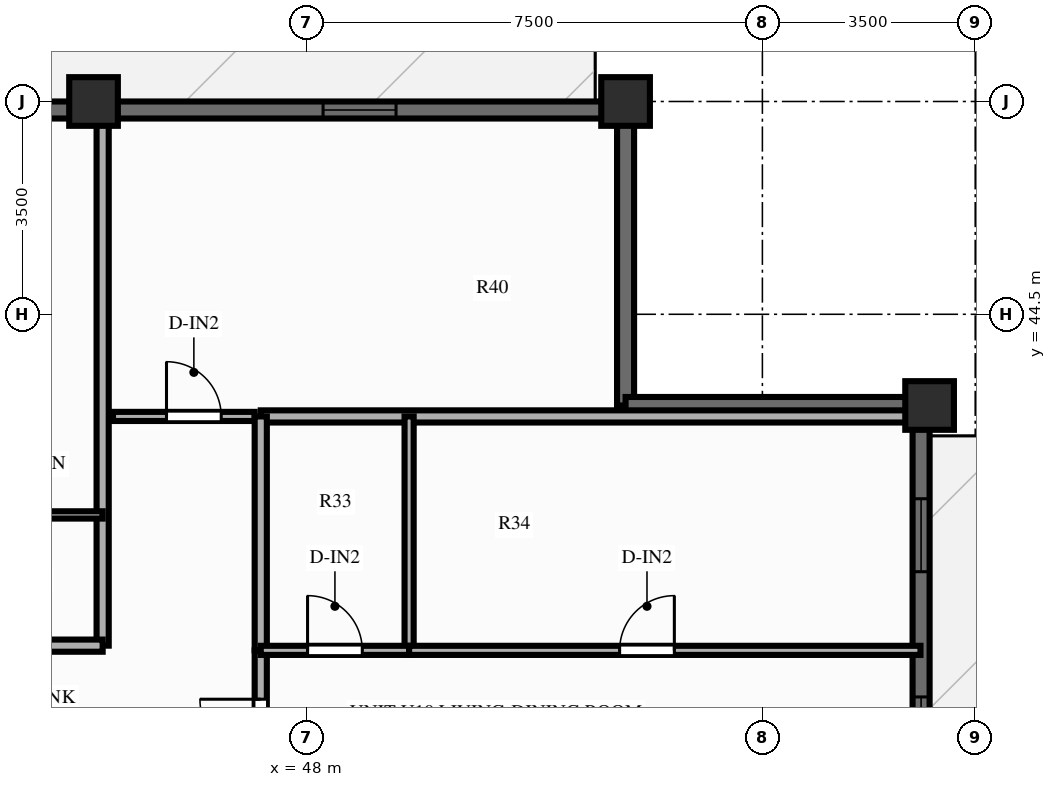
"""IFC4 building model, lengths in metres.
Left out: names, types, materials, properties, quantities, classifications, styles, units other than length and angle.
Written with IfcOpenShell. Run it as: python <this file> out.ifc"""

import sys

from ifc_helpers import new_model, si_unit, direction, frame, frame_2d, origin, origin_2d, place, context, subcontext, project, spatial, rectangle, extrude, source, transform, mapped, element, fill, save


model = new_model("IFC4")
c1 = context("Model", 3, precision=1e-05, world=origin(), true_north=direction((0.0, 1.0)))
c2 = subcontext(c1, "Body", "Model", "MODEL_VIEW")
j1 = project(units=[si_unit("LENGTHUNIT", "METRE"), si_unit("PLANEANGLEUNIT", "RADIAN")], contexts=[c1])
p1 = place(None, origin())
s1 = spatial("IfcSite", under=j1, at=p1, CompositionType="ELEMENT")
p2 = place(p1, origin())
s2 = spatial("IfcBuilding", under=s1, at=p2, CompositionType="ELEMENT")
p3 = place(p2, frame((0.0, 0.0, 179.8)))
s3 = spatial("IfcBuildingStorey", under=s2, at=p3, CompositionType="ELEMENT", Elevation=179.8)
m1 = source(origin(), c2, "Body", "SweptSolid", [
    extrude(rectangle(XDim=0.8, YDim=0.8, at=origin_2d()), origin(), (0.0, 0.0, 1.0), 3.0),
])
for number, where, z_axis, x_axis in (
    (1, (58.25, 43.0, 0.0), (0.0, 0.0, 1.0), (1.0, 0.0, 0.0)),
    (2, (53.25, 48.0, 0.0), (0.0, 0.0, 1.0), (1.0, 0.0, 0.0)),
    (3, (44.5, 48.0, 0.0), (0.0, 0.0, 1.0), (1.0, 0.0, 0.0)),
):
    element("IfcColumn", number, at=place(p3, frame(where, z_axis=z_axis, x_axis=x_axis)), inside=s3, PredefinedType="COLUMN", context=c2, shape_type="MappedRepresentation", body=[
        mapped(m1, transform((0.0, 0.0, 0.0), scale=1.0)),
    ])
p4 = place(p3, frame((22.75, 47.86, 0.0), z_axis=(0.0, 0.0, 1.0), x_axis=(1.0, 0.0, 0.0)))
e4 = element("IfcWall", 4, at=p4, inside=s3, PredefinedType="SOLIDWALL", context=c2, shape_type="SweptSolid", body=[
    extrude(rectangle(XDim=30.5, YDim=0.28, at=frame_2d((15.25, 0.0))), origin(), (0.0, 0.0, 1.0), 2.28),
])
p5 = place(p4, frame((3.825, 0.0, 0.0)))
e5 = element("IfcOpeningElement", 5, at=p5, cuts=e4, PredefinedType="OPENING", context=c2, shape_type="SweptSolid", body=[
    extrude(rectangle(XDim=1.1, YDim=2.15, at=frame_2d((0.55, 1.075))), frame((0.0, 0.152, 0.0), z_axis=(0.0, -1.0, 0.0), x_axis=(1.0, 0.0, 0.0)), (0.0, 0.0, 1.0), 0.304),
])
p6 = place(p4, frame((9.395, 0.0, 0.25)))
e6 = element("IfcOpeningElement", 6, at=p6, cuts=e4, PredefinedType="OPENING", context=c2, shape_type="SweptSolid", body=[
    extrude(rectangle(XDim=0.95, YDim=1.5, at=frame_2d((0.475, 0.75))), frame((0.0, 0.152, 0.0), z_axis=(0.0, -1.0, 0.0), x_axis=(1.0, 0.0, 0.0)), (0.0, 0.0, 1.0), 0.304),
])
p7 = place(p4, frame((11.33, 0.0, 0.25)))
e7 = element("IfcOpeningElement", 7, at=p7, cuts=e4, PredefinedType="OPENING", context=c2, shape_type="SweptSolid", body=[
    extrude(rectangle(XDim=1.2, YDim=1.5, at=frame_2d((0.6, 0.75))), frame((0.0, 0.152, 0.0), z_axis=(0.0, -1.0, 0.0), x_axis=(1.0, 0.0, 0.0)), (0.0, 0.0, 1.0), 0.304),
])
p8 = place(p4, frame((13.894, 0.0, 0.25)))
e8 = element("IfcOpeningElement", 8, at=p8, cuts=e4, PredefinedType="OPENING", context=c2, shape_type="SweptSolid", body=[
    extrude(rectangle(XDim=1.2, YDim=1.5, at=frame_2d((0.6, 0.75))), frame((0.0, 0.152, 0.0), z_axis=(0.0, -1.0, 0.0), x_axis=(1.0, 0.0, 0.0)), (0.0, 0.0, 1.0), 0.304),
])
p9 = place(p4, frame((16.905, 0.0, 0.25)))
e9 = element("IfcOpeningElement", 9, at=p9, cuts=e4, PredefinedType="OPENING", context=c2, shape_type="SweptSolid", body=[
    extrude(rectangle(XDim=1.2, YDim=1.5, at=frame_2d((0.6, 0.75))), frame((0.0, 0.152, 0.0), z_axis=(0.0, -1.0, 0.0), x_axis=(1.0, 0.0, 0.0)), (0.0, 0.0, 1.0), 0.304),
])
p10 = place(p4, frame((19.72, 0.0, 0.25)))
e10 = element("IfcOpeningElement", 10, at=p10, cuts=e4, PredefinedType="OPENING", context=c2, shape_type="SweptSolid", body=[
    extrude(rectangle(XDim=1.2, YDim=1.5, at=frame_2d((0.6, 0.75))), frame((0.0, 0.152, 0.0), z_axis=(0.0, -1.0, 0.0), x_axis=(1.0, 0.0, 0.0)), (0.0, 0.0, 1.0), 0.304),
])
p11 = place(p4, frame((25.525, 0.0, 0.25)))
e11 = element("IfcOpeningElement", 11, at=p11, cuts=e4, PredefinedType="OPENING", context=c2, shape_type="SweptSolid", body=[
    extrude(rectangle(XDim=1.2, YDim=1.5, at=frame_2d((0.6, 0.75))), frame((0.0, 0.152, 0.0), z_axis=(0.0, -1.0, 0.0), x_axis=(1.0, 0.0, 0.0)), (0.0, 0.0, 1.0), 0.304),
])
p12 = place(p3, frame((58.11, 11.0, 0.0), z_axis=(0.0, 0.0, 1.0), x_axis=(0.0, 1.0, 0.0)))
e12 = element("IfcWall", 12, at=p12, inside=s3, PredefinedType="SOLIDWALL", context=c2, shape_type="SweptSolid", body=[
    extrude(rectangle(XDim=32.0, YDim=0.28, at=frame_2d((16.0, 0.0))), origin(), (0.0, 0.0, 1.0), 2.28),
])
p13 = place(p12, frame((1.05, 0.0, 0.25)))
e13 = element("IfcOpeningElement", 13, at=p13, cuts=e12, PredefinedType="OPENING", context=c2, shape_type="SweptSolid", body=[
    extrude(rectangle(XDim=1.2, YDim=1.5, at=frame_2d((0.6, 0.75))), frame((0.0, 0.152, 0.0), z_axis=(0.0, -1.0, 0.0), x_axis=(1.0, 0.0, 0.0)), (0.0, 0.0, 1.0), 0.304),
])
p14 = place(p12, frame((4.31, 0.0, 0.25)))
e14 = element("IfcOpeningElement", 14, at=p14, cuts=e12, PredefinedType="OPENING", context=c2, shape_type="SweptSolid", body=[
    extrude(rectangle(XDim=1.2, YDim=1.5, at=frame_2d((0.6, 0.75))), frame((0.0, 0.152, 0.0), z_axis=(0.0, -1.0, 0.0), x_axis=(1.0, 0.0, 0.0)), (0.0, 0.0, 1.0), 0.304),
])
p15 = place(p12, frame((8.882, 0.0, 0.25)))
e15 = element("IfcOpeningElement", 15, at=p15, cuts=e12, PredefinedType="OPENING", context=c2, shape_type="SweptSolid", body=[
    extrude(rectangle(XDim=1.2, YDim=1.5, at=frame_2d((0.6, 0.75))), frame((0.0, 0.152, 0.0), z_axis=(0.0, -1.0, 0.0), x_axis=(1.0, 0.0, 0.0)), (0.0, 0.0, 1.0), 0.304),
])
p16 = place(p12, frame((12.029, 0.0, 0.25)))
e16 = element("IfcOpeningElement", 16, at=p16, cuts=e12, PredefinedType="OPENING", context=c2, shape_type="SweptSolid", body=[
    extrude(rectangle(XDim=1.2, YDim=1.5, at=frame_2d((0.6, 0.75))), frame((0.0, 0.152, 0.0), z_axis=(0.0, -1.0, 0.0), x_axis=(1.0, 0.0, 0.0)), (0.0, 0.0, 1.0), 0.304),
])
p17 = place(p12, frame((16.718, 0.0, 0.0), z_axis=(0.0, 0.0, 1.0), x_axis=(-1.0, 0.0, 0.0)))
e17 = element("IfcOpeningElement", 17, at=p17, cuts=e12, PredefinedType="OPENING", context=c2, shape_type="SweptSolid", body=[
    extrude(rectangle(XDim=1.6, YDim=2.15, at=frame_2d((0.8, 1.075))), frame((0.0, 0.152, 0.0), z_axis=(0.0, -1.0, 0.0), x_axis=(1.0, 0.0, 0.0)), (0.0, 0.0, 1.0), 0.304),
])
p18 = place(p12, frame((19.163, 0.0, 0.25)))
e18 = element("IfcOpeningElement", 18, at=p18, cuts=e12, PredefinedType="OPENING", context=c2, shape_type="SweptSolid", body=[
    extrude(rectangle(XDim=1.2, YDim=1.5, at=frame_2d((0.6, 0.75))), frame((0.0, 0.152, 0.0), z_axis=(0.0, -1.0, 0.0), x_axis=(1.0, 0.0, 0.0)), (0.0, 0.0, 1.0), 0.304),
])
p19 = place(p12, frame((22.47, 0.0, 0.25)))
e19 = element("IfcOpeningElement", 19, at=p19, cuts=e12, PredefinedType="OPENING", context=c2, shape_type="SweptSolid", body=[
    extrude(rectangle(XDim=1.2, YDim=1.5, at=frame_2d((0.6, 0.75))), frame((0.0, 0.152, 0.0), z_axis=(0.0, -1.0, 0.0), x_axis=(1.0, 0.0, 0.0)), (0.0, 0.0, 1.0), 0.304),
])
p20 = place(p12, frame((26.006, 0.0, 0.25)))
e20 = element("IfcOpeningElement", 20, at=p20, cuts=e12, PredefinedType="OPENING", context=c2, shape_type="SweptSolid", body=[
    extrude(rectangle(XDim=1.2, YDim=1.5, at=frame_2d((0.6, 0.75))), frame((0.0, 0.152, 0.0), z_axis=(0.0, -1.0, 0.0), x_axis=(1.0, 0.0, 0.0)), (0.0, 0.0, 1.0), 0.304),
])
p21 = place(p12, frame((29.266, 0.0, 0.25)))
e21 = element("IfcOpeningElement", 21, at=p21, cuts=e12, PredefinedType="OPENING", context=c2, shape_type="SweptSolid", body=[
    extrude(rectangle(XDim=1.2, YDim=1.5, at=frame_2d((0.6, 0.75))), frame((0.0, 0.152, 0.0), z_axis=(0.0, -1.0, 0.0), x_axis=(1.0, 0.0, 0.0)), (0.0, 0.0, 1.0), 0.304),
])
for number, where, z_axis, x_axis in (
    (22, (53.25, 43.0, 0.0), (0.0, 0.0, 1.0), (0.0, 1.0, 0.0)),
    (23, (53.25, 43.0, 0.0), (0.0, 0.0, 1.0), (1.0, 0.0, 0.0)),
):
    element("IfcWall", number, at=place(p3, frame(where, z_axis=z_axis, x_axis=x_axis)), inside=s3, PredefinedType="SOLIDWALL", context=c2, shape_type="SweptSolid", body=[
        extrude(rectangle(XDim=4.92, YDim=0.28, at=frame_2d((2.46, 0.0))), origin(), (0.0, 0.0, 1.0), 2.28),
    ])
p22 = place(p3, frame((44.82, 42.82, 0.0), z_axis=(0.0, 0.0, 1.0), x_axis=(1.0, 0.0, 0.0)))
e24 = element("IfcWall", 24, at=p22, inside=s3, PredefinedType="PARTITIONING", context=c2, shape_type="SweptSolid", body=[
    extrude(rectangle(XDim=2.33, YDim=0.15, at=frame_2d((1.165, 0.0))), origin(), (0.0, 0.0, 1.0), 2.79),
])
p23 = place(p22, frame((0.88, 0.0, 0.0)))
e25 = element("IfcOpeningElement", 25, at=p23, cuts=e24, PredefinedType="OPENING", context=c2, shape_type="SweptSolid", body=[
    extrude(rectangle(XDim=0.9, YDim=2.1, at=frame_2d((0.45, 1.05))), frame((0.0, 0.087, 0.0), z_axis=(0.0, -1.0, 0.0), x_axis=(1.0, 0.0, 0.0)), (0.0, 0.0, 1.0), 0.174),
])
p24 = place(p3, frame((44.65, 39.05, 0.0), z_axis=(0.0, 0.0, 1.0), x_axis=(0.0, 1.0, 0.0)))
e26 = element("IfcWall", 26, at=p24, inside=s3, PredefinedType="PARTITIONING", context=c2, shape_type="SweptSolid", body=[
    extrude(rectangle(XDim=8.8, YDim=0.2, at=frame_2d((4.4, 0.0))), origin(), (0.0, 0.0, 1.0), 2.39),
])
p25 = place(p3, frame((41.88, 39.05, 0.0), z_axis=(0.0, 0.0, 1.0), x_axis=(1.0, 0.0, 0.0)))
e27 = element("IfcWall", 27, at=p25, inside=s3, PredefinedType="PARTITIONING", context=c2, shape_type="SweptSolid", body=[
    extrude(rectangle(XDim=2.77, YDim=0.2, at=frame_2d((1.385, 0.0))), origin(), (0.0, 0.0, 1.0), 2.79),
])
p26 = place(p3, frame((41.88, 41.2, 0.0), z_axis=(0.0, 0.0, 1.0), x_axis=(1.0, 0.0, 0.0)))
e28 = element("IfcWall", 28, at=p26, inside=s3, PredefinedType="PARTITIONING", context=c2, shape_type="SweptSolid", body=[
    extrude(rectangle(XDim=2.77, YDim=0.12, at=frame_2d((1.385, 0.0))), origin(), (0.0, 0.0, 1.0), 2.79),
])
p27 = place(p3, frame((47.25, 42.82, 0.0), z_axis=(0.0, 0.0, 1.0), x_axis=(1.0, 0.0, 0.0)))
e29 = element("IfcWall", 29, at=p27, inside=s3, PredefinedType="PARTITIONING", context=c2, shape_type="SweptSolid", body=[
    extrude(rectangle(XDim=10.85, YDim=0.2, at=frame_2d((5.425, 0.0))), origin(), (0.0, 0.0, 1.0), 2.79),
])
p28 = place(p3, frame((47.25, 35.445, 0.0), z_axis=(0.0, 0.0, 1.0), x_axis=(0.0, 1.0, 0.0)))
e30 = element("IfcWall", 30, at=p28, inside=s3, PredefinedType="PARTITIONING", context=c2, shape_type="SweptSolid", body=[
    extrude(rectangle(XDim=3.527, YDim=0.2, at=frame_2d((1.764, 0.0))), origin(), (0.0, 0.0, 1.0), 2.79),
])
p29 = place(p28, frame((1.724, 0.0, 0.0)))
e31 = element("IfcOpeningElement", 31, at=p29, cuts=e30, PredefinedType="OPENING", context=c2, shape_type="SweptSolid", body=[
    extrude(rectangle(XDim=1.0, YDim=2.15, at=frame_2d((0.5, 1.075))), frame((0.0, 0.112, 0.0), z_axis=(0.0, -1.0, 0.0), x_axis=(1.0, 0.0, 0.0)), (0.0, 0.0, 1.0), 0.224),
])
p30 = place(p3, frame((47.25, 38.973, 0.0), z_axis=(0.0, 0.0, 1.0), x_axis=(0.0, 1.0, 0.0)))
e32 = element("IfcWall", 32, at=p30, inside=s3, PredefinedType="PARTITIONING", context=c2, shape_type="SweptSolid", body=[
    extrude(rectangle(XDim=3.847, YDim=0.2, at=frame_2d((1.924, 0.0))), origin(), (0.0, 0.0, 1.0), 2.79),
])
p31 = place(p3, frame((49.69, 38.973, 0.0), z_axis=(0.0, 0.0, 1.0), x_axis=(0.0, 1.0, 0.0)))
e33 = element("IfcWall", 33, at=p31, inside=s3, PredefinedType="PARTITIONING", context=c2, shape_type="SweptSolid", body=[
    extrude(rectangle(XDim=3.847, YDim=0.15, at=frame_2d((1.924, 0.0))), origin(), (0.0, 0.0, 1.0), 2.79),
])
p32 = place(p3, frame((47.25, 38.973, 0.0), z_axis=(0.0, 0.0, 1.0), x_axis=(1.0, 0.0, 0.0)))
e34 = element("IfcWall", 34, at=p32, inside=s3, PredefinedType="PARTITIONING", context=c2, shape_type="SweptSolid", body=[
    extrude(rectangle(XDim=2.44, YDim=0.15, at=frame_2d((1.22, 0.0))), origin(), (0.0, 0.0, 1.0), 2.79),
])
p33 = place(p32, frame((0.77, 0.0, 0.0)))
e35 = element("IfcOpeningElement", 35, at=p33, cuts=e34, PredefinedType="OPENING", context=c2, shape_type="SweptSolid", body=[
    extrude(rectangle(XDim=0.9, YDim=2.1, at=frame_2d((0.45, 1.05))), frame((0.0, 0.087, 0.0), z_axis=(0.0, -1.0, 0.0), x_axis=(1.0, 0.0, 0.0)), (0.0, 0.0, 1.0), 0.174),
])
p34 = place(p3, frame((49.69, 38.973, 0.0), z_axis=(0.0, 0.0, 1.0), x_axis=(1.0, 0.0, 0.0)))
e36 = element("IfcWall", 36, at=p34, inside=s3, PredefinedType="PARTITIONING", context=c2, shape_type="SweptSolid", body=[
    extrude(rectangle(XDim=8.41, YDim=0.15, at=frame_2d((4.205, 0.0))), origin(), (0.0, 0.0, 1.0), 2.79),
])
p35 = place(p34, frame((3.462, 0.0, 0.0)))
e37 = element("IfcOpeningElement", 37, at=p35, cuts=e36, PredefinedType="OPENING", context=c2, shape_type="SweptSolid", body=[
    extrude(rectangle(XDim=0.9, YDim=2.1, at=frame_2d((0.45, 1.05))), frame((0.0, 0.087, 0.0), z_axis=(0.0, -1.0, 0.0), x_axis=(1.0, 0.0, 0.0)), (0.0, 0.0, 1.0), 0.174),
])
m2 = source(origin(), c2, "Body", "SweptSolid", [
    extrude(rectangle(XDim=1.2, YDim=1.5, at=frame_2d((0.6, 0.75))), frame((0.0, 0.03, 0.0), z_axis=(0.0, -1.0, 0.0), x_axis=(1.0, 0.0, 0.0)), (0.0, 0.0, 1.0), 0.06),
])
p36 = place(p11, origin())
e38 = element("IfcWindow", 38, at=p36, inside=s3, PartitioningType="SINGLE_PANEL", PredefinedType="WINDOW", context=c2, shape_type="MappedRepresentation", body=[
    mapped(m2, transform((0.0, 0.0, 0.0), scale=1.0)),
])
fill(e11, e38)
p37 = place(p20, origin())
e39 = element("IfcWindow", 39, at=p37, inside=s3, PartitioningType="SINGLE_PANEL", PredefinedType="WINDOW", context=c2, shape_type="MappedRepresentation", body=[
    mapped(m2, transform((0.0, 0.0, 0.0), scale=1.0)),
])
fill(e20, e39)
p38 = place(p21, origin())
e40 = element("IfcWindow", 40, at=p38, inside=s3, PartitioningType="SINGLE_PANEL", PredefinedType="WINDOW", context=c2, shape_type="MappedRepresentation", body=[
    mapped(m2, transform((0.0, 0.0, 0.0), scale=1.0)),
])
fill(e21, e40)
m3 = source(origin(), c2, "Body", "SweptSolid", [
    extrude(rectangle(XDim=0.9, YDim=2.1, at=frame_2d((0.45, 1.05))), frame((0.0, 0.025, 0.0), z_axis=(0.0, -1.0, 0.0), x_axis=(1.0, 0.0, 0.0)), (0.0, 0.0, 1.0), 0.05),
])
p39 = place(p23, origin())
e41 = element("IfcDoor", 41, at=p39, inside=s3, OperationType="SINGLE_SWING_LEFT", PredefinedType="DOOR", context=c2, shape_type="MappedRepresentation", body=[
    mapped(m3, transform((0.0, 0.0, 0.0), scale=1.0)),
])
fill(e25, e41)
m4 = source(origin(), c2, "Body", "SweptSolid", [
    extrude(rectangle(XDim=1.0, YDim=2.15, at=frame_2d((0.5, 1.075))), frame((0.0, 0.025, 0.0), z_axis=(0.0, -1.0, 0.0), x_axis=(1.0, 0.0, 0.0)), (0.0, 0.0, 1.0), 0.05),
])
p40 = place(p29, origin())
e42 = element("IfcDoor", 42, at=p40, inside=s3, OperationType="SINGLE_SWING_RIGHT", PredefinedType="DOOR", context=c2, shape_type="MappedRepresentation", body=[
    mapped(m4, transform((0.0, 0.0, 0.0), scale=1.0)),
])
fill(e31, e42)
p41 = place(p33, origin())
e43 = element("IfcDoor", 43, at=p41, inside=s3, OperationType="SINGLE_SWING_LEFT", PredefinedType="DOOR", context=c2, shape_type="MappedRepresentation", body=[
    mapped(m3, transform((0.0, 0.0, 0.0), scale=1.0)),
])
fill(e35, e43)
p42 = place(p35, origin())
e44 = element("IfcDoor", 44, at=p42, inside=s3, OperationType="SINGLE_SWING_RIGHT", PredefinedType="DOOR", context=c2, shape_type="MappedRepresentation", body=[
    mapped(m3, transform((0.0, 0.0, 0.0), scale=1.0)),
])
fill(e37, e44)
save(model, sys.argv[1])
